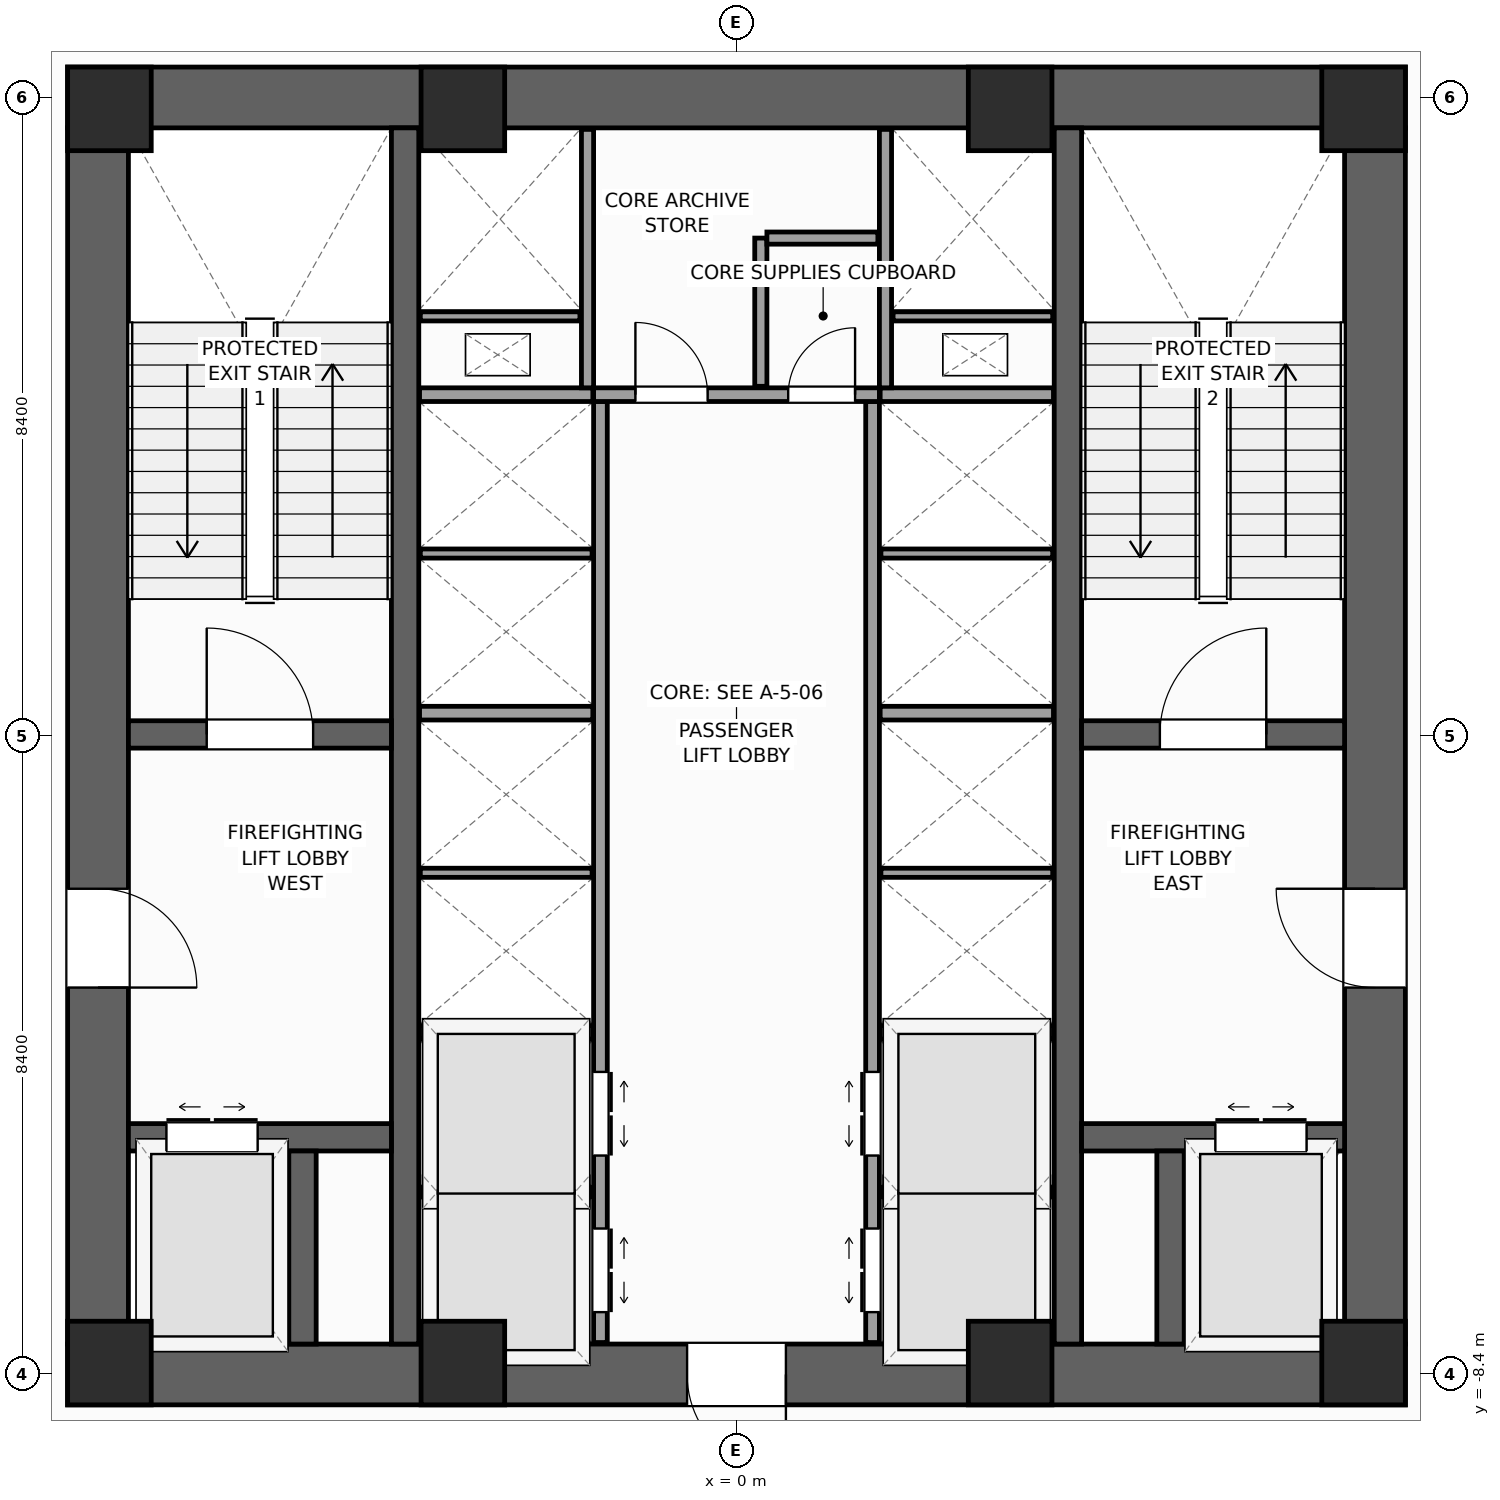
"""IFC4 building model, lengths in metres.
Left out: names, types, materials, properties, quantities, classifications, styles, units other than length and angle.
Written with IfcOpenShell. Run it as: python <this file> out.ifc"""

import sys

from ifc_helpers import new_model, si_unit, direction, frame, frame_2d, origin, origin_2d, place, context, subcontext, project, spatial, rectangle, extrude, source, transform, mapped, element, fill, save


model = new_model("IFC4")
c1 = context("Model", 3, precision=1e-05, world=origin(), true_north=direction((0.0, 1.0)))
c2 = subcontext(c1, "Body", "Model", "MODEL_VIEW")
j1 = project(units=[si_unit("LENGTHUNIT", "METRE"), si_unit("PLANEANGLEUNIT", "RADIAN")], contexts=[c1])
p1 = place(None, origin())
s1 = spatial("IfcSite", under=j1, at=p1, CompositionType="ELEMENT")
p2 = place(p1, origin())
s2 = spatial("IfcBuilding", under=s1, at=p2, CompositionType="ELEMENT")
p3 = place(p2, frame((0.0, 0.0, 16.0)))
s3 = spatial("IfcBuildingStorey", under=s2, at=p3, CompositionType="ELEMENT", Elevation=16.0)
p4 = place(p3, frame((-8.8, -8.4, 0.0), z_axis=(0.0, 0.0, 1.0), x_axis=(1.0, 0.0, 0.0)))
e1 = element("IfcWall", 1, at=p4, inside=s3, PredefinedType="SHEAR", context=c2, shape_type="SweptSolid", body=[
    extrude(rectangle(XDim=17.6, YDim=0.8, at=frame_2d((8.8, 0.0))), origin(), (0.0, 0.0, 1.0), 5.0),
])
p5 = place(p4, frame((8.15, 0.0, 0.0)))
e2 = element("IfcOpeningElement", 2, at=p5, cuts=e1, PredefinedType="OPENING", context=c2, shape_type="SweptSolid", body=[
    extrude(rectangle(XDim=1.3, YDim=2.2, at=frame_2d((0.65, 1.1))), frame((0.0, 0.41, 0.0), z_axis=(0.0, -1.0, 0.0), x_axis=(1.0, 0.0, 0.0)), (0.0, 0.0, 1.0), 0.82),
])
p6 = place(p3, frame((-8.8, 8.4, 0.0), z_axis=(0.0, 0.0, 1.0), x_axis=(1.0, 0.0, 0.0)))
e3 = element("IfcWall", 3, at=p6, inside=s3, PredefinedType="SHEAR", context=c2, shape_type="SweptSolid", body=[
    extrude(rectangle(XDim=17.6, YDim=0.8, at=frame_2d((8.8, 0.0))), origin(), (0.0, 0.0, 1.0), 5.0),
])
p7 = place(p3, frame((-8.4, -8.0, 0.0), z_axis=(0.0, 0.0, 1.0), x_axis=(0.0, 1.0, 0.0)))
e4 = element("IfcWall", 4, at=p7, inside=s3, PredefinedType="SHEAR", context=c2, shape_type="SweptSolid", body=[
    extrude(rectangle(XDim=16.0, YDim=0.8, at=frame_2d((8.0, 0.0))), origin(), (0.0, 0.0, 1.0), 5.0),
])
p8 = place(p7, frame((4.69, 0.0, 0.0)))
e5 = element("IfcOpeningElement", 5, at=p8, cuts=e4, PredefinedType="OPENING", context=c2, shape_type="SweptSolid", body=[
    extrude(rectangle(XDim=1.3, YDim=2.2, at=frame_2d((0.65, 1.1))), frame((0.0, 0.41, 0.0), z_axis=(0.0, -1.0, 0.0), x_axis=(1.0, 0.0, 0.0)), (0.0, 0.0, 1.0), 0.82),
])
p9 = place(p3, frame((8.4, -8.0, 0.0), z_axis=(0.0, 0.0, 1.0), x_axis=(0.0, 1.0, 0.0)))
e6 = element("IfcWall", 6, at=p9, inside=s3, PredefinedType="SHEAR", context=c2, shape_type="SweptSolid", body=[
    extrude(rectangle(XDim=16.0, YDim=0.8, at=frame_2d((8.0, 0.0))), origin(), (0.0, 0.0, 1.0), 5.0),
])
p10 = place(p9, frame((4.69, 0.0, 0.0)))
e7 = element("IfcOpeningElement", 7, at=p10, cuts=e6, PredefinedType="OPENING", context=c2, shape_type="SweptSolid", body=[
    extrude(rectangle(XDim=1.3, YDim=2.2, at=frame_2d((0.65, 1.1))), frame((0.0, 0.41, 0.0), z_axis=(0.0, -1.0, 0.0), x_axis=(1.0, 0.0, 0.0)), (0.0, 0.0, 1.0), 0.82),
])
for number, where, z_axis, x_axis in (
    (8, (-4.36, -8.0, 0.0), (0.0, 0.0, 1.0), (0.0, 1.0, 0.0)),
    (9, (4.36, -8.0, 0.0), (0.0, 0.0, 1.0), (0.0, 1.0, 0.0)),
):
    element("IfcWall", number, at=place(p3, frame(where, z_axis=z_axis, x_axis=x_axis)), inside=s3, PredefinedType="SHEAR", context=c2, shape_type="SweptSolid", body=[
        extrude(rectangle(XDim=16.0, YDim=0.36, at=frame_2d((8.0, 0.0))), origin(), (0.0, 0.0, 1.0), 5.0),
    ])
p11 = place(p3, frame((-8.0, 0.02, 0.0), z_axis=(0.0, 0.0, 1.0), x_axis=(1.0, 0.0, 0.0)))
e10 = element("IfcWall", 10, at=p11, inside=s3, PredefinedType="SHEAR", context=c2, shape_type="SweptSolid", body=[
    extrude(rectangle(XDim=3.46, YDim=0.36, at=frame_2d((1.73, 0.0))), origin(), (0.0, 0.0, 1.0), 5.0),
])
p12 = place(p11, frame((1.03, 0.0, 0.0)))
e11 = element("IfcOpeningElement", 11, at=p12, cuts=e10, PredefinedType="OPENING", context=c2, shape_type="SweptSolid", body=[
    extrude(rectangle(XDim=1.4, YDim=2.2, at=frame_2d((0.7, 1.1))), frame((0.0, 0.19, 0.0), z_axis=(0.0, -1.0, 0.0), x_axis=(1.0, 0.0, 0.0)), (0.0, 0.0, 1.0), 0.38),
])
p13 = place(p3, frame((4.54, 0.02, 0.0), z_axis=(0.0, 0.0, 1.0), x_axis=(1.0, 0.0, 0.0)))
e12 = element("IfcWall", 12, at=p13, inside=s3, PredefinedType="SHEAR", context=c2, shape_type="SweptSolid", body=[
    extrude(rectangle(XDim=3.46, YDim=0.36, at=frame_2d((1.73, 0.0))), origin(), (0.0, 0.0, 1.0), 5.0),
])
p14 = place(p13, frame((1.03, 0.0, 0.0)))
e13 = element("IfcOpeningElement", 13, at=p14, cuts=e12, PredefinedType="OPENING", context=c2, shape_type="SweptSolid", body=[
    extrude(rectangle(XDim=1.4, YDim=2.2, at=frame_2d((0.7, 1.1))), frame((0.0, 0.19, 0.0), z_axis=(0.0, -1.0, 0.0), x_axis=(1.0, 0.0, 0.0)), (0.0, 0.0, 1.0), 0.38),
])
p15 = place(p3, frame((-8.0, -5.28, 0.0), z_axis=(0.0, 0.0, 1.0), x_axis=(1.0, 0.0, 0.0)))
e14 = element("IfcWall", 14, at=p15, inside=s3, PredefinedType="SHEAR", context=c2, shape_type="SweptSolid", body=[
    extrude(rectangle(XDim=3.46, YDim=0.36, at=frame_2d((1.73, 0.0))), origin(), (0.0, 0.0, 1.0), 5.0),
])
p16 = place(p15, frame((0.5, 0.0, 0.0)))
e15 = element("IfcOpeningElement", 15, at=p16, cuts=e14, PredefinedType="OPENING", context=c2, shape_type="SweptSolid", body=[
    extrude(rectangle(XDim=1.2, YDim=2.25, at=frame_2d((0.6, 1.125))), frame((0.0, 0.19, 0.0), z_axis=(0.0, -1.0, 0.0), x_axis=(1.0, 0.0, 0.0)), (0.0, 0.0, 1.0), 0.38),
])
p17 = place(p3, frame((4.54, -5.28, 0.0), z_axis=(0.0, 0.0, 1.0), x_axis=(1.0, 0.0, 0.0)))
e16 = element("IfcWall", 16, at=p17, inside=s3, PredefinedType="SHEAR", context=c2, shape_type="SweptSolid", body=[
    extrude(rectangle(XDim=3.46, YDim=0.36, at=frame_2d((1.73, 0.0))), origin(), (0.0, 0.0, 1.0), 5.0),
])
p18 = place(p17, frame((1.76, 0.0, 0.0)))
e17 = element("IfcOpeningElement", 17, at=p18, cuts=e16, PredefinedType="OPENING", context=c2, shape_type="SweptSolid", body=[
    extrude(rectangle(XDim=1.2, YDim=2.25, at=frame_2d((0.6, 1.125))), frame((0.0, 0.19, 0.0), z_axis=(0.0, -1.0, 0.0), x_axis=(1.0, 0.0, 0.0)), (0.0, 0.0, 1.0), 0.38),
])
for number, where, z_axis, x_axis in (
    (18, (-5.71, -8.0, 0.0), (0.0, 0.0, 1.0), (0.0, 1.0, 0.0)),
    (19, (5.71, -8.0, 0.0), (0.0, 0.0, 1.0), (0.0, 1.0, 0.0)),
):
    element("IfcWall", number, at=place(p3, frame(where, z_axis=z_axis, x_axis=x_axis)), inside=s3, PredefinedType="SHEAR", context=c2, shape_type="SweptSolid", body=[
        extrude(rectangle(XDim=2.54, YDim=0.36, at=frame_2d((1.27, 0.0))), origin(), (0.0, 0.0, 1.0), 5.0),
    ])
m1 = source(origin(), c2, "Body", "SweptSolid", [
    extrude(rectangle(XDim=1.1, YDim=1.1, at=origin_2d()), origin(), (0.0, 0.0, 1.0), 5.0),
])
for number, where, z_axis, x_axis in (
    (20, (-8.25, -8.25, 0.0), (0.0, 0.0, 1.0), (1.0, 0.0, 0.0)),
    (21, (8.25, -8.25, 0.0), (0.0, 0.0, 1.0), (1.0, 0.0, 0.0)),
    (22, (8.25, 8.25, 0.0), (0.0, 0.0, 1.0), (1.0, 0.0, 0.0)),
    (23, (-8.25, 8.25, 0.0), (0.0, 0.0, 1.0), (1.0, 0.0, 0.0)),
    (24, (-3.6, -8.25, 0.0), (0.0, 0.0, 1.0), (1.0, 0.0, 0.0)),
    (25, (3.6, -8.25, 0.0), (0.0, 0.0, 1.0), (1.0, 0.0, 0.0)),
    (26, (-3.6, 8.25, 0.0), (0.0, 0.0, 1.0), (1.0, 0.0, 0.0)),
    (27, (3.6, 8.25, 0.0), (0.0, 0.0, 1.0), (1.0, 0.0, 0.0)),
):
    element("IfcColumn", number, at=place(p3, frame(where, z_axis=z_axis, x_axis=x_axis)), inside=s3, PredefinedType="PILASTER", context=c2, shape_type="MappedRepresentation", body=[
        mapped(m1, transform((0.0, 0.0, 0.0), scale=1.0)),
    ])
p19 = place(p3, frame((-1.79, -7.98, 0.0), z_axis=(0.0, 0.0, 1.0), x_axis=(0.0, 1.0, 0.0)))
e28 = element("IfcWall", 28, at=p19, inside=s3, PredefinedType="PARTITIONING", context=c2, shape_type="SweptSolid", body=[
    extrude(rectangle(XDim=12.38, YDim=0.18, at=frame_2d((6.19, 0.0))), origin(), (0.0, 0.0, 1.0), 4.66),
])
p20 = place(p19, frame((0.4, 0.0, 0.0)))
e29 = element("IfcOpeningElement", 29, at=p20, cuts=e28, PredefinedType="OPENING", context=c2, shape_type="SweptSolid", body=[
    extrude(rectangle(XDim=1.1, YDim=2.2, at=frame_2d((0.55, 1.1))), frame((0.0, 0.1, 0.0), z_axis=(0.0, -1.0, 0.0), x_axis=(1.0, 0.0, 0.0)), (0.0, 0.0, 1.0), 0.2),
])
p21 = place(p19, frame((2.46, 0.0, 0.0)))
e30 = element("IfcOpeningElement", 30, at=p21, cuts=e28, PredefinedType="OPENING", context=c2, shape_type="SweptSolid", body=[
    extrude(rectangle(XDim=1.1, YDim=2.2, at=frame_2d((0.55, 1.1))), frame((0.0, 0.1, 0.0), z_axis=(0.0, -1.0, 0.0), x_axis=(1.0, 0.0, 0.0)), (0.0, 0.0, 1.0), 0.2),
])
p22 = place(p3, frame((1.79, -7.98, 0.0), z_axis=(0.0, 0.0, 1.0), x_axis=(0.0, 1.0, 0.0)))
e31 = element("IfcWall", 31, at=p22, inside=s3, PredefinedType="PARTITIONING", context=c2, shape_type="SweptSolid", body=[
    extrude(rectangle(XDim=12.38, YDim=0.18, at=frame_2d((6.19, 0.0))), origin(), (0.0, 0.0, 1.0), 4.66),
])
p23 = place(p22, frame((0.4, 0.0, 0.0)))
e32 = element("IfcOpeningElement", 32, at=p23, cuts=e31, PredefinedType="OPENING", context=c2, shape_type="SweptSolid", body=[
    extrude(rectangle(XDim=1.1, YDim=2.2, at=frame_2d((0.55, 1.1))), frame((0.0, 0.1, 0.0), z_axis=(0.0, -1.0, 0.0), x_axis=(1.0, 0.0, 0.0)), (0.0, 0.0, 1.0), 0.2),
])
p24 = place(p22, frame((2.46, 0.0, 0.0)))
e33 = element("IfcOpeningElement", 33, at=p24, cuts=e31, PredefinedType="OPENING", context=c2, shape_type="SweptSolid", body=[
    extrude(rectangle(XDim=1.1, YDim=2.2, at=frame_2d((0.55, 1.1))), frame((0.0, 0.1, 0.0), z_axis=(0.0, -1.0, 0.0), x_axis=(1.0, 0.0, 0.0)), (0.0, 0.0, 1.0), 0.2),
])
p25 = place(p3, frame((-1.88, 4.49, 0.0), z_axis=(0.0, 0.0, 1.0), x_axis=(1.0, 0.0, 0.0)))
e34 = element("IfcWall", 34, at=p25, inside=s3, PredefinedType="PARTITIONING", context=c2, shape_type="SweptSolid", body=[
    extrude(rectangle(XDim=3.76, YDim=0.18, at=frame_2d((1.88, 0.0))), origin(), (0.0, 0.0, 1.0), 4.66),
])
p26 = place(p25, frame((0.55, 0.0, 0.0)))
e35 = element("IfcOpeningElement", 35, at=p26, cuts=e34, PredefinedType="OPENING", context=c2, shape_type="SweptSolid", body=[
    extrude(rectangle(XDim=0.95, YDim=2.1, at=frame_2d((0.475, 1.05))), frame((0.0, 0.1, 0.0), z_axis=(0.0, -1.0, 0.0), x_axis=(1.0, 0.0, 0.0)), (0.0, 0.0, 1.0), 0.2),
])
p27 = place(p25, frame((2.56, 0.0, 0.0)))
e36 = element("IfcOpeningElement", 36, at=p27, cuts=e34, PredefinedType="OPENING", context=c2, shape_type="SweptSolid", body=[
    extrude(rectangle(XDim=0.88, YDim=2.1, at=frame_2d((0.44, 1.05))), frame((0.0, 0.1, 0.0), z_axis=(0.0, -1.0, 0.0), x_axis=(1.0, 0.0, 0.0)), (0.0, 0.0, 1.0), 0.2),
])
for number, where, z_axis, x_axis in (
    (37, (-4.17, -3.9, 0.0), (0.0, 0.0, 1.0), (1.0, 0.0, 0.0)),
    (38, (1.89, -3.9, 0.0), (0.0, 0.0, 1.0), (1.0, 0.0, 0.0)),
    (39, (-4.17, 0.3, 0.0), (0.0, 0.0, 1.0), (1.0, 0.0, 0.0)),
    (40, (1.89, 0.3, 0.0), (0.0, 0.0, 1.0), (1.0, 0.0, 0.0)),
    (41, (-4.17, 4.49, 0.0), (0.0, 0.0, 1.0), (1.0, 0.0, 0.0)),
    (42, (1.89, 4.49, 0.0), (0.0, 0.0, 1.0), (1.0, 0.0, 0.0)),
):
    element("IfcWall", number, at=place(p3, frame(where, z_axis=z_axis, x_axis=x_axis)), inside=s3, PredefinedType="PARTITIONING", context=c2, shape_type="SweptSolid", body=[
        extrude(rectangle(XDim=2.28, YDim=0.18, at=frame_2d((1.14, 0.0))), origin(), (0.0, 0.0, 1.0), 4.66),
    ])
for number, where, z_axis, x_axis in (
    (43, (-4.16, -6.0, 0.0), (0.0, 0.0, 1.0), (1.0, 0.0, 0.0)),
    (44, (1.9, -6.0, 0.0), (0.0, 0.0, 1.0), (1.0, 0.0, 0.0)),
    (45, (-4.16, -1.8, 0.0), (0.0, 0.0, 1.0), (1.0, 0.0, 0.0)),
    (46, (1.9, -1.8, 0.0), (0.0, 0.0, 1.0), (1.0, 0.0, 0.0)),
    (47, (-4.16, 2.4, 0.0), (0.0, 0.0, 1.0), (1.0, 0.0, 0.0)),
    (48, (1.9, 2.4, 0.0), (0.0, 0.0, 1.0), (1.0, 0.0, 0.0)),
):
    element("IfcWall", number, at=place(p3, frame(where, z_axis=z_axis, x_axis=x_axis)), inside=s3, PredefinedType="PARTITIONING", context=c2, shape_type="SweptSolid", body=[
        extrude(rectangle(XDim=2.26, YDim=0.12, at=frame_2d((1.13, 0.0))), origin(), (0.0, 0.0, 1.0), 4.66),
    ])
for number, where, z_axis, x_axis in (
    (49, (-1.96, 4.58, 0.0), (0.0, 0.0, 1.0), (0.0, 1.0, 0.0)),
    (50, (1.96, 4.58, 0.0), (0.0, 0.0, 1.0), (0.0, 1.0, 0.0)),
):
    element("IfcWall", number, at=place(p3, frame(where, z_axis=z_axis, x_axis=x_axis)), inside=s3, PredefinedType="PARTITIONING", context=c2, shape_type="SweptSolid", body=[
        extrude(rectangle(XDim=3.4, YDim=0.16, at=frame_2d((1.7, 0.0))), origin(), (0.0, 0.0, 1.0), 4.66),
    ])
for number, where, z_axis, x_axis in (
    (51, (-4.16, 5.52, 0.0), (0.0, 0.0, 1.0), (1.0, 0.0, 0.0)),
    (52, (2.06, 5.52, 0.0), (0.0, 0.0, 1.0), (1.0, 0.0, 0.0)),
):
    element("IfcWall", number, at=place(p3, frame(where, z_axis=z_axis, x_axis=x_axis)), inside=s3, PredefinedType="PARTITIONING", context=c2, shape_type="SweptSolid", body=[
        extrude(rectangle(XDim=2.1, YDim=0.12, at=frame_2d((1.05, 0.0))), origin(), (0.0, 0.0, 1.0), 4.66),
    ])
p28 = place(p3, frame((0.32, 4.6, 0.0), z_axis=(0.0, 0.0, 1.0), x_axis=(0.0, 1.0, 0.0)))
e53 = element("IfcWall", 53, at=p28, inside=s3, PredefinedType="PARTITIONING", context=c2, shape_type="SweptSolid", body=[
    extrude(rectangle(XDim=1.95, YDim=0.16, at=frame_2d((0.975, 0.0))), origin(), (0.0, 0.0, 1.0), 4.66),
])
p29 = place(p3, frame((0.4, 6.55, 0.0), z_axis=(0.0, 0.0, 1.0), x_axis=(1.0, 0.0, 0.0)))
e54 = element("IfcWall", 54, at=p29, inside=s3, PredefinedType="PARTITIONING", context=c2, shape_type="SweptSolid", body=[
    extrude(rectangle(XDim=1.46, YDim=0.16, at=frame_2d((0.73, 0.0))), origin(), (0.0, 0.0, 1.0), 4.66),
])
m2 = source(origin(), c2, "Body", "SweptSolid", [
    extrude(rectangle(XDim=1.4, YDim=2.2, at=frame_2d((0.7, 1.1))), frame((0.0, 0.025, 0.0), z_axis=(0.0, -1.0, 0.0), x_axis=(1.0, 0.0, 0.0)), (0.0, 0.0, 1.0), 0.05),
])
p30 = place(p12, origin())
e55 = element("IfcDoor", 55, at=p30, inside=s3, OperationType="SINGLE_SWING_LEFT", PredefinedType="DOOR", context=c2, shape_type="MappedRepresentation", body=[
    mapped(m2, transform((0.0, 0.0, 0.0), scale=1.0)),
])
fill(e11, e55)
p31 = place(p14, origin())
e56 = element("IfcDoor", 56, at=p31, inside=s3, OperationType="SINGLE_SWING_RIGHT", PredefinedType="DOOR", context=c2, shape_type="MappedRepresentation", body=[
    mapped(m2, transform((0.0, 0.0, 0.0), scale=1.0)),
])
fill(e13, e56)
m3 = source(origin(), c2, "Body", "SweptSolid", [
    extrude(rectangle(XDim=1.3, YDim=2.2, at=frame_2d((0.65, 1.1))), frame((0.0, 0.025, 0.0), z_axis=(0.0, -1.0, 0.0), x_axis=(1.0, 0.0, 0.0)), (0.0, 0.0, 1.0), 0.05),
])
p32 = place(p8, frame((1.3, 0.0, 0.0), z_axis=(0.0, 0.0, 1.0), x_axis=(-1.0, 0.0, 0.0)))
e57 = element("IfcDoor", 57, at=p32, inside=s3, OperationType="SINGLE_SWING_LEFT", PredefinedType="DOOR", context=c2, shape_type="MappedRepresentation", body=[
    mapped(m3, transform((0.0, 0.0, 0.0), scale=1.0)),
])
fill(e5, e57)
p33 = place(p10, origin())
e58 = element("IfcDoor", 58, at=p33, inside=s3, OperationType="SINGLE_SWING_RIGHT", PredefinedType="DOOR", context=c2, shape_type="MappedRepresentation", body=[
    mapped(m3, transform((0.0, 0.0, 0.0), scale=1.0)),
])
fill(e7, e58)
p34 = place(p5, frame((1.3, 0.0, 0.0), z_axis=(0.0, 0.0, 1.0), x_axis=(-1.0, 0.0, 0.0)))
e59 = element("IfcDoor", 59, at=p34, inside=s3, OperationType="SINGLE_SWING_RIGHT", PredefinedType="DOOR", context=c2, shape_type="MappedRepresentation", body=[
    mapped(m3, transform((0.0, 0.0, 0.0), scale=1.0)),
])
fill(e2, e59)
m4 = source(origin(), c2, "Body", "SweptSolid", [
    extrude(rectangle(XDim=1.2, YDim=2.25, at=frame_2d((0.6, 1.125))), frame((0.0, 0.025, 0.0), z_axis=(0.0, -1.0, 0.0), x_axis=(1.0, 0.0, 0.0)), (0.0, 0.0, 1.0), 0.05),
])
p35 = place(p16, origin())
e60 = element("IfcDoor", 60, at=p35, inside=s3, OperationType="DOUBLE_DOOR_SLIDING", PredefinedType="DOOR", context=c2, shape_type="MappedRepresentation", body=[
    mapped(m4, transform((0.0, 0.0, 0.0), scale=1.0)),
])
fill(e15, e60)
p36 = place(p18, origin())
e61 = element("IfcDoor", 61, at=p36, inside=s3, OperationType="DOUBLE_DOOR_SLIDING", PredefinedType="DOOR", context=c2, shape_type="MappedRepresentation", body=[
    mapped(m4, transform((0.0, 0.0, 0.0), scale=1.0)),
])
fill(e17, e61)
m5 = source(origin(), c2, "Body", "SweptSolid", [
    extrude(rectangle(XDim=1.1, YDim=2.2, at=frame_2d((0.55, 1.1))), frame((0.0, 0.025, 0.0), z_axis=(0.0, -1.0, 0.0), x_axis=(1.0, 0.0, 0.0)), (0.0, 0.0, 1.0), 0.05),
])
p37 = place(p20, frame((1.1, 0.0, 0.0), z_axis=(0.0, 0.0, 1.0), x_axis=(-1.0, 0.0, 0.0)))
e62 = element("IfcDoor", 62, at=p37, inside=s3, OperationType="DOUBLE_DOOR_SLIDING", PredefinedType="DOOR", context=c2, shape_type="MappedRepresentation", body=[
    mapped(m5, transform((0.0, 0.0, 0.0), scale=1.0)),
])
fill(e29, e62)
p38 = place(p21, frame((1.1, 0.0, 0.0), z_axis=(0.0, 0.0, 1.0), x_axis=(-1.0, 0.0, 0.0)))
e63 = element("IfcDoor", 63, at=p38, inside=s3, OperationType="DOUBLE_DOOR_SLIDING", PredefinedType="DOOR", context=c2, shape_type="MappedRepresentation", body=[
    mapped(m5, transform((0.0, 0.0, 0.0), scale=1.0)),
])
fill(e30, e63)
p39 = place(p23, origin())
e64 = element("IfcDoor", 64, at=p39, inside=s3, OperationType="DOUBLE_DOOR_SLIDING", PredefinedType="DOOR", context=c2, shape_type="MappedRepresentation", body=[
    mapped(m5, transform((0.0, 0.0, 0.0), scale=1.0)),
])
fill(e32, e64)
p40 = place(p24, origin())
e65 = element("IfcDoor", 65, at=p40, inside=s3, OperationType="DOUBLE_DOOR_SLIDING", PredefinedType="DOOR", context=c2, shape_type="MappedRepresentation", body=[
    mapped(m5, transform((0.0, 0.0, 0.0), scale=1.0)),
])
fill(e33, e65)
m6 = source(origin(), c2, "Body", "SweptSolid", [
    extrude(rectangle(XDim=0.95, YDim=2.1, at=frame_2d((0.475, 1.05))), frame((0.0, 0.025, 0.0), z_axis=(0.0, -1.0, 0.0), x_axis=(1.0, 0.0, 0.0)), (0.0, 0.0, 1.0), 0.05),
])
p41 = place(p26, origin())
e66 = element("IfcDoor", 66, at=p41, inside=s3, OperationType="SINGLE_SWING_LEFT", PredefinedType="DOOR", context=c2, shape_type="MappedRepresentation", body=[
    mapped(m6, transform((0.0, 0.0, 0.0), scale=1.0)),
])
fill(e35, e66)
m7 = source(origin(), c2, "Body", "SweptSolid", [
    extrude(rectangle(XDim=0.88, YDim=2.1, at=frame_2d((0.44, 1.05))), frame((0.0, 0.025, 0.0), z_axis=(0.0, -1.0, 0.0), x_axis=(1.0, 0.0, 0.0)), (0.0, 0.0, 1.0), 0.05),
])
p42 = place(p27, origin())
e67 = element("IfcDoor", 67, at=p42, inside=s3, OperationType="SINGLE_SWING_RIGHT", PredefinedType="DOOR", context=c2, shape_type="MappedRepresentation", body=[
    mapped(m7, transform((0.0, 0.0, 0.0), scale=1.0)),
])
fill(e36, e67)
save(model, sys.argv[1])
